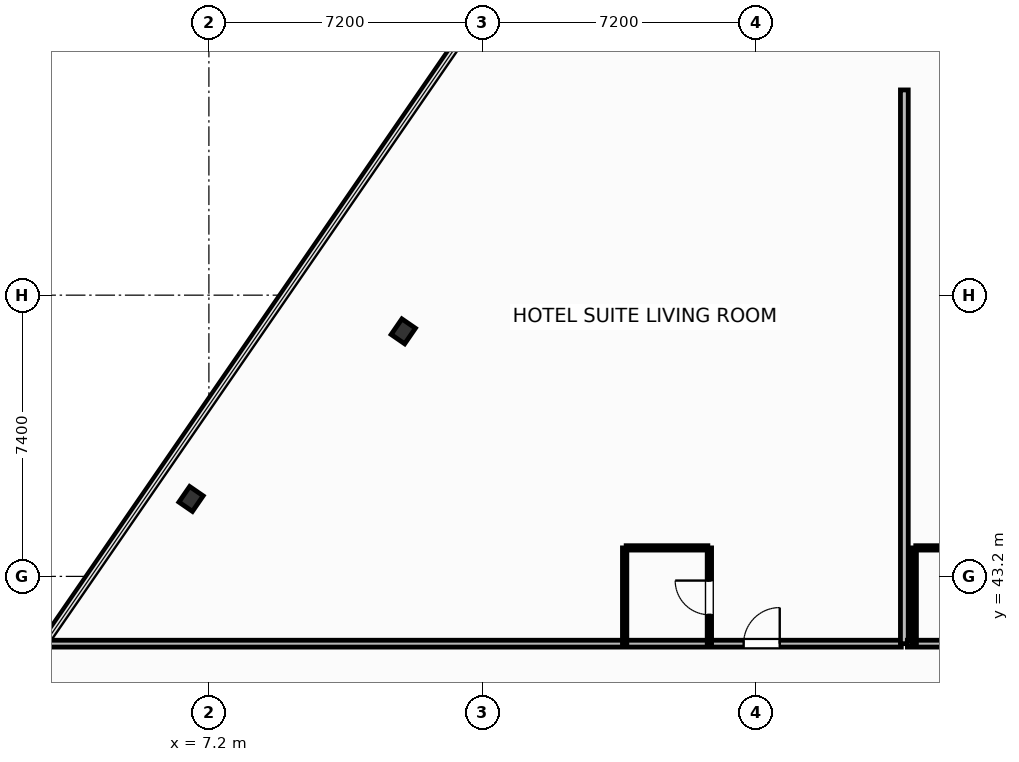
"""IFC4 building model, lengths in metres.
Left out: names, types, materials, properties, quantities, classifications, styles, units other than length and angle.
Written with IfcOpenShell. Run it as: python <this file> out.ifc"""

import sys

from ifc_helpers import new_model, si_unit, direction, frame, frame_2d, origin, origin_2d, place, context, subcontext, project, spatial, rectangle, i_section, extrude, element, fill, save


model = new_model("IFC4")
c1 = context("Model", 3, precision=1e-05, world=origin(), true_north=direction((0.0, 1.0)))
c2 = subcontext(c1, "Body", "Model", "MODEL_VIEW")
j1 = project(units=[si_unit("LENGTHUNIT", "METRE"), si_unit("PLANEANGLEUNIT", "RADIAN")], contexts=[c1])
p1 = place(None, origin())
s1 = spatial("IfcSite", under=j1, at=p1, CompositionType="ELEMENT")
p2 = place(p1, origin())
s2 = spatial("IfcBuilding", under=s1, at=p2, CompositionType="ELEMENT")
p3 = place(p2, frame((0.0, 0.0, 34.4)))
s3 = spatial("IfcBuildingStorey", under=s2, at=p3, CompositionType="ELEMENT", Elevation=34.4)
for number, where, z_axis, x_axis in (
    (1, (12.315, 49.647, 0.0), (0.0, 0.0, 1.0), (0.824, -0.567, 0.0)),
    (2, (6.73, 45.238, 0.0), (0.0, 0.0, 1.0), (0.824, -0.567, 0.0)),
):
    element("IfcColumn", number, at=place(p3, frame(where, z_axis=z_axis, x_axis=x_axis)), inside=s3, PredefinedType="COLUMN", context=c2, shape_type="SweptSolid", body=[
        extrude(i_section(OverallWidth=0.432, OverallDepth=0.498, WebThickness=0.056, FlangeThickness=0.089, FilletRadius=0.025, at=origin_2d()), origin(), (0.0, 0.0, 1.0), 3.7),
    ])
p4 = place(p3, frame((44.882, 51.962, 0.0), z_axis=(0.0, 0.0, 1.0), x_axis=(-0.823534427573, 0.567266292497, 0.0)))
e3 = element("IfcWall", 3, at=p4, inside=s3, PredefinedType="SOLIDWALL", context=c2, shape_type="SweptSolid", body=[
    extrude(rectangle(XDim=23.147, YDim=0.22, at=frame_2d((11.574, 0.0))), origin(), (0.0, 0.0, 1.0), 2.73),
])
p5 = place(p4, frame((10.749, 0.0, 0.8)))
e4 = element("IfcOpeningElement", 4, at=p5, cuts=e3, PredefinedType="OPENING", context=c2, shape_type="SweptSolid", body=[
    extrude(rectangle(XDim=1.65, YDim=1.65, at=frame_2d((0.825, 0.825))), frame((0.0, 0.12, 0.0), z_axis=(0.0, -1.0, 0.0), x_axis=(1.0, 0.0, 0.0)), (0.0, 0.0, 1.0), 0.24),
])
p6 = place(p3, frame((2.921, 41.43, 0.0), z_axis=(0.0, 0.0, 1.0), x_axis=(1.0, 0.0, 0.0)))
e5 = element("IfcWall", 5, at=p6, inside=s3, PredefinedType="PARTITIONING", context=c2, shape_type="SweptSolid", body=[
    extrude(rectangle(XDim=22.499, YDim=0.18, at=frame_2d((11.25, 0.0))), origin(), (0.0, 0.0, 1.0), 3.45),
])
p7 = place(p6, frame((18.35, 0.0, 0.0)))
e6 = element("IfcOpeningElement", 6, at=p7, cuts=e5, PredefinedType="OPENING", context=c2, shape_type="SweptSolid", body=[
    extrude(rectangle(XDim=0.95, YDim=2.15, at=frame_2d((0.475, 1.075))), frame((0.0, 0.1, 0.0), z_axis=(0.0, -1.0, 0.0), x_axis=(1.0, 0.0, 0.0)), (0.0, 0.0, 1.0), 0.2),
])
p8 = place(p3, frame((18.18, 43.95, 0.0), z_axis=(0.0, 0.0, 1.0), x_axis=(1.0, 0.0, 0.0)))
e7 = element("IfcWall", 7, at=p8, inside=s3, PredefinedType="PARTITIONING", context=c2, shape_type="SweptSolid", body=[
    extrude(rectangle(XDim=2.15, YDim=0.115, at=frame_2d((1.075, 0.0))), origin(), (0.0, 0.0, 1.0), 3.45),
])
p9 = place(p3, frame((20.37, 41.43, 0.0), z_axis=(0.0, 0.0, 1.0), x_axis=(0.0, 1.0, 0.0)))
e8 = element("IfcWall", 8, at=p9, inside=s3, PredefinedType="PARTITIONING", context=c2, shape_type="SweptSolid", body=[
    extrude(rectangle(XDim=2.52, YDim=0.115, at=frame_2d((1.26, 0.0))), origin(), (0.0, 0.0, 1.0), 3.45),
])
p10 = place(p9, frame((0.76, 0.0, 0.0)))
e9 = element("IfcOpeningElement", 9, at=p10, cuts=e8, PredefinedType="OPENING", context=c2, shape_type="SweptSolid", body=[
    extrude(rectangle(XDim=0.9, YDim=2.05, at=frame_2d((0.45, 1.025))), frame((0.0, 0.067, 0.0), z_axis=(0.0, -1.0, 0.0), x_axis=(1.0, 0.0, 0.0)), (0.0, 0.0, 1.0), 0.135),
])
p11 = place(p3, frame((18.14, 41.43, 0.0), z_axis=(0.0, 0.0, 1.0), x_axis=(0.0, 1.0, 0.0)))
e10 = element("IfcWall", 10, at=p11, inside=s3, PredefinedType="PARTITIONING", context=c2, shape_type="SweptSolid", body=[
    extrude(rectangle(XDim=2.52, YDim=0.115, at=frame_2d((1.26, 0.0))), origin(), (0.0, 0.0, 1.0), 3.45),
])
p12 = place(p3, frame((25.5, 41.43, 0.0), z_axis=(0.0, 0.0, 1.0), x_axis=(0.0, 1.0, 0.0)))
e11 = element("IfcWall", 11, at=p12, inside=s3, PredefinedType="PARTITIONING", context=c2, shape_type="SweptSolid", body=[
    extrude(rectangle(XDim=14.57, YDim=0.205, at=frame_2d((7.285, 0.0))), origin(), (0.0, 0.0, 1.0), 3.45),
])
p13 = place(p3, frame((25.58, 41.43, 0.0), z_axis=(0.0, 0.0, 1.0), x_axis=(1.0, 0.0, 0.0)))
e12 = element("IfcWall", 12, at=p13, inside=s3, PredefinedType="PARTITIONING", context=c2, shape_type="SweptSolid", body=[
    extrude(rectangle(XDim=6.84, YDim=0.18, at=frame_2d((3.42, 0.0))), origin(), (0.0, 0.0, 1.0), 3.45),
])
p14 = place(p13, frame((3.29, 0.0, 0.0)))
e13 = element("IfcOpeningElement", 13, at=p14, cuts=e12, PredefinedType="OPENING", context=c2, shape_type="SweptSolid", body=[
    extrude(rectangle(XDim=0.95, YDim=2.15, at=frame_2d((0.475, 1.075))), frame((0.0, 0.1, 0.0), z_axis=(0.0, -1.0, 0.0), x_axis=(1.0, 0.0, 0.0)), (0.0, 0.0, 1.0), 0.2),
])
p15 = place(p3, frame((25.8, 43.95, 0.0), z_axis=(0.0, 0.0, 1.0), x_axis=(1.0, 0.0, 0.0)))
e14 = element("IfcWall", 14, at=p15, inside=s3, PredefinedType="PARTITIONING", context=c2, shape_type="SweptSolid", body=[
    extrude(rectangle(XDim=2.15, YDim=0.115, at=frame_2d((1.075, 0.0))), origin(), (0.0, 0.0, 1.0), 3.45),
])
p16 = place(p3, frame((25.76, 41.43, 0.0), z_axis=(0.0, 0.0, 1.0), x_axis=(0.0, 1.0, 0.0)))
e15 = element("IfcWall", 15, at=p16, inside=s3, PredefinedType="PARTITIONING", context=c2, shape_type="SweptSolid", body=[
    extrude(rectangle(XDim=2.52, YDim=0.115, at=frame_2d((1.26, 0.0))), origin(), (0.0, 0.0, 1.0), 3.45),
])
p17 = place(p7, origin())
e16 = element("IfcDoor", 16, at=p17, inside=s3, OperationType="SINGLE_SWING_RIGHT", PredefinedType="DOOR", context=c2, shape_type="SweptSolid", body=[
    extrude(rectangle(XDim=0.95, YDim=2.15, at=frame_2d((0.475, 1.075))), frame((0.0, 0.025, 0.0), z_axis=(0.0, -1.0, 0.0), x_axis=(1.0, 0.0, 0.0)), (0.0, 0.0, 1.0), 0.05),
])
fill(e6, e16)
p18 = place(p10, origin())
e17 = element("IfcDoor", 17, at=p18, inside=s3, OperationType="SINGLE_SWING_RIGHT", PredefinedType="DOOR", context=c2, shape_type="SweptSolid", body=[
    extrude(rectangle(XDim=0.9, YDim=2.05, at=frame_2d((0.45, 1.025))), frame((0.0, 0.025, 0.0), z_axis=(0.0, -1.0, 0.0), x_axis=(1.0, 0.0, 0.0)), (0.0, 0.0, 1.0), 0.05),
])
fill(e9, e17)
save(model, sys.argv[1])
